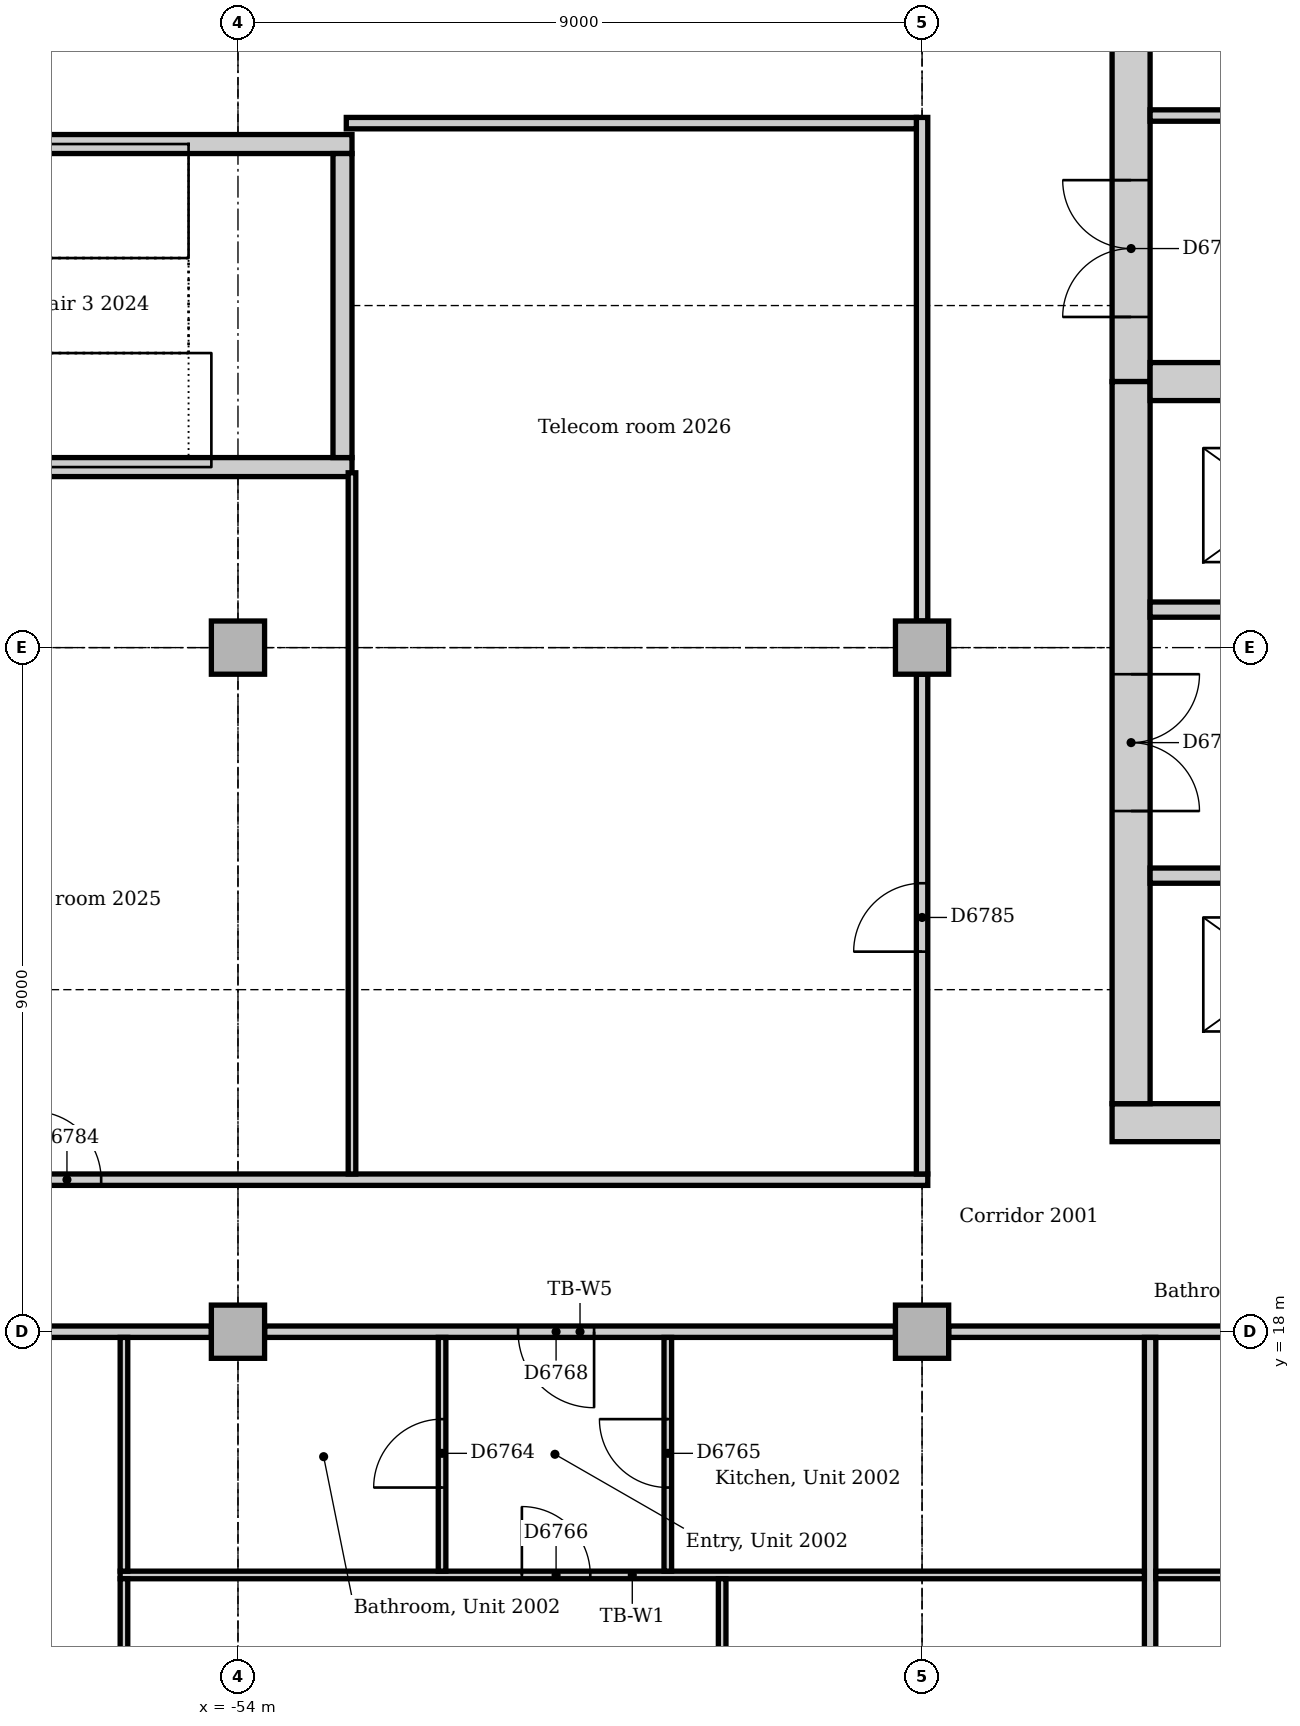
"""IFC4 building model, lengths in metres.
Left out: names, types, materials, properties, quantities, classifications, styles, units other than length and angle.
Written with IfcOpenShell. Run it as: python <this file> out.ifc"""

import sys

from ifc_helpers import new_model, si_unit, direction, frame, frame_2d, origin, origin_2d, place, context, subcontext, project, spatial, rectangle, extrude, element, fill, save


model = new_model("IFC4")
c1 = context("Model", 3, precision=1e-05, world=origin(), true_north=direction((0.0, 1.0)))
c2 = subcontext(c1, "Body", "Model", "MODEL_VIEW")
j1 = project(units=[si_unit("LENGTHUNIT", "METRE"), si_unit("PLANEANGLEUNIT", "RADIAN")], contexts=[c1])
p1 = place(None, origin())
s1 = spatial("IfcSite", under=j1, at=p1, CompositionType="ELEMENT")
p2 = place(p1, origin())
s2 = spatial("IfcBuilding", under=s1, at=p2, CompositionType="ELEMENT")
p3 = place(p2, frame((0.0, 0.0, 87.0)))
s3 = spatial("IfcBuildingStorey", under=s2, at=p3, CompositionType="ELEMENT", Elevation=87.0)
p4 = place(p3, frame((-42.5, 20.75, 0.0), z_axis=(0.0, 0.0, 1.0), x_axis=(1.0, 0.0, 0.0)))
e1 = element("IfcWall", 1, at=p4, inside=s3, PredefinedType="SOLIDWALL", context=c2, shape_type="SweptSolid", body=[
    extrude(rectangle(XDim=11.5, YDim=0.5, at=frame_2d((5.75, 0.0))), origin(), (0.0, 0.0, 1.0), 4.0),
])
p5 = place(p3, frame((-42.25, 42.0, 0.0), z_axis=(0.0, 0.0, 1.0), x_axis=(0.0, -1.0, 0.0)))
e2 = element("IfcWall", 2, at=p5, inside=s3, PredefinedType="SOLIDWALL", context=c2, shape_type="SweptSolid", body=[
    extrude(rectangle(XDim=11.5, YDim=0.5, at=frame_2d((5.75, 0.0))), origin(), (0.0, 0.0, 1.0), 4.0),
])
p6 = place(p5, frame((8.85, 0.0, 0.0)))
e3 = element("IfcOpeningElement", 3, at=p6, cuts=e2, PredefinedType="OPENING", context=c2, shape_type="SweptSolid", body=[
    extrude(rectangle(XDim=1.8, YDim=2.1, at=frame_2d((0.9, 1.05))), frame((0.0, 0.26, 0.0), z_axis=(0.0, -1.0, 0.0), x_axis=(1.0, 0.0, 0.0)), (0.0, 0.0, 1.0), 0.52),
])
p7 = place(p3, frame((-42.25, 30.5, 0.0), z_axis=(0.0, 0.0, 1.0), x_axis=(0.0, -1.0, 0.0)))
e4 = element("IfcWall", 4, at=p7, inside=s3, PredefinedType="SOLIDWALL", context=c2, shape_type="SweptSolid", body=[
    extrude(rectangle(XDim=9.5, YDim=0.5, at=frame_2d((4.75, 0.0))), origin(), (0.0, 0.0, 1.0), 4.0),
])
p8 = place(p7, frame((3.85, 0.0, 0.0)))
e5 = element("IfcOpeningElement", 5, at=p8, cuts=e4, PredefinedType="OPENING", context=c2, shape_type="SweptSolid", body=[
    extrude(rectangle(XDim=1.8, YDim=2.1, at=frame_2d((0.9, 1.05))), frame((0.0, 0.26, 0.0), z_axis=(0.0, -1.0, 0.0), x_axis=(1.0, 0.0, 0.0)), (0.0, 0.0, 1.0), 0.52),
])
p9 = place(p3, frame((-42.0, 30.5, 0.0), z_axis=(0.0, 0.0, 1.0), x_axis=(1.0, 0.0, 0.0)))
e6 = element("IfcWall", 6, at=p9, inside=s3, PredefinedType="SOLIDWALL", context=c2, shape_type="SweptSolid", body=[
    extrude(rectangle(XDim=10.5, YDim=0.5, at=frame_2d((5.25, 0.0))), origin(), (0.0, 0.0, 1.0), 4.0),
])
p10 = place(p3, frame((-60.0, 29.375, 0.0), z_axis=(0.0, 0.0, 1.0), x_axis=(1.0, 0.0, 0.0)))
e7 = element("IfcWall", 7, at=p10, inside=s3, PredefinedType="SOLIDWALL", context=c2, shape_type="SweptSolid", body=[
    extrude(rectangle(XDim=7.5, YDim=0.25, at=frame_2d((3.75, 0.0))), origin(), (0.0, 0.0, 1.0), 4.0),
])
p11 = place(p3, frame((-52.5, 33.625, 0.0), z_axis=(0.0, 0.0, 1.0), x_axis=(-1.0, 0.0, 0.0)))
e8 = element("IfcWall", 8, at=p11, inside=s3, PredefinedType="SOLIDWALL", context=c2, shape_type="SweptSolid", body=[
    extrude(rectangle(XDim=7.5, YDim=0.25, at=frame_2d((3.75, 0.0))), origin(), (0.0, 0.0, 1.0), 4.0),
])
p12 = place(p11, frame((6.0, 0.0, 0.0)))
e9 = element("IfcOpeningElement", 9, at=p12, cuts=e8, PredefinedType="OPENING", context=c2, shape_type="SweptSolid", body=[
    extrude(rectangle(XDim=1.0, YDim=2.1, at=frame_2d((0.5, 1.05))), frame((0.0, 0.135, 0.0), z_axis=(0.0, -1.0, 0.0), x_axis=(1.0, 0.0, 0.0)), (0.0, 0.0, 1.0), 0.27),
])
p13 = place(p3, frame((-52.625, 29.5, 0.0), z_axis=(0.0, 0.0, 1.0), x_axis=(0.0, 1.0, 0.0)))
e10 = element("IfcWall", 10, at=p13, inside=s3, PredefinedType="SOLIDWALL", context=c2, shape_type="SweptSolid", body=[
    extrude(rectangle(XDim=4.0, YDim=0.25, at=frame_2d((2.0, 0.0))), origin(), (0.0, 0.0, 1.0), 4.0),
])
for number, where, z_axis, x_axis in (
    (11, (-54.0, 18.0, 0.0), (0.0, 0.0, 1.0), (1.0, 0.0, 0.0)),
    (12, (-54.0, 27.0, 0.0), (0.0, 0.0, 1.0), (1.0, 0.0, 0.0)),
    (13, (-45.0, 18.0, 0.0), (0.0, 0.0, 1.0), (1.0, 0.0, 0.0)),
    (14, (-45.0, 27.0, 0.0), (0.0, 0.0, 1.0), (1.0, 0.0, 0.0)),
):
    element("IfcColumn", number, at=place(p3, frame(where, z_axis=z_axis, x_axis=x_axis)), inside=s3, PredefinedType="COLUMN", context=c2, shape_type="SweptSolid", body=[
        extrude(rectangle(XDim=0.7, YDim=0.7, at=origin_2d()), origin(), (0.0, 0.0, 1.0), 3.85),
    ])
p14 = place(p3, frame((-38.6, 24.0, 0.0), z_axis=(0.0, 0.0, 1.0), x_axis=(-1.0, 0.0, 0.0)))
e15 = element("IfcWall", 15, at=p14, inside=s3, PredefinedType="SOLIDWALL", context=c2, shape_type="SweptSolid", body=[
    extrude(rectangle(XDim=3.4, YDim=0.2, at=frame_2d((1.7, 0.0))), origin(), (0.0, 0.0, 1.0), 4.0),
])
p15 = place(p14, frame((0.85, 0.0, 0.0)))
e16 = element("IfcOpeningElement", 16, at=p15, cuts=e15, PredefinedType="OPENING", context=c2, shape_type="SweptSolid", body=[
    extrude(rectangle(XDim=1.1, YDim=2.1, at=frame_2d((0.55, 1.05))), frame((0.0, 0.11, 0.0), z_axis=(0.0, -1.0, 0.0), x_axis=(1.0, 0.0, 0.0)), (0.0, 0.0, 1.0), 0.22),
])
p16 = place(p3, frame((-42.0, 27.5, 0.0), z_axis=(0.0, 0.0, 1.0), x_axis=(1.0, 0.0, 0.0)))
e17 = element("IfcWall", 17, at=p16, inside=s3, PredefinedType="SOLIDWALL", context=c2, shape_type="SweptSolid", body=[
    extrude(rectangle(XDim=3.4, YDim=0.2, at=frame_2d((1.7, 0.0))), origin(), (0.0, 0.0, 1.0), 4.0),
])
p17 = place(p16, frame((1.45, 0.0, 0.0)))
e18 = element("IfcOpeningElement", 18, at=p17, cuts=e17, PredefinedType="OPENING", context=c2, shape_type="SweptSolid", body=[
    extrude(rectangle(XDim=1.1, YDim=2.1, at=frame_2d((0.55, 1.05))), frame((0.0, 0.11, 0.0), z_axis=(0.0, -1.0, 0.0), x_axis=(1.0, 0.0, 0.0)), (0.0, 0.0, 1.0), 0.22),
])
p18 = place(p3, frame((-37.425, 34.0, 0.0), z_axis=(0.0, 0.0, 1.0), x_axis=(-1.0, 0.0, 0.0)))
e19 = element("IfcWall", 19, at=p18, inside=s3, PredefinedType="PARTITIONING", context=c2, shape_type="SweptSolid", body=[
    extrude(rectangle(XDim=4.575, YDim=0.15, at=frame_2d((2.288, 0.0))), origin(), (0.0, 0.0, 1.0), 3.85),
])
p19 = place(p18, frame((1.925, 0.0, 0.0)))
e20 = element("IfcOpeningElement", 20, at=p19, cuts=e19, PredefinedType="OPENING", context=c2, shape_type="SweptSolid", body=[
    extrude(rectangle(XDim=0.8, YDim=2.1, at=frame_2d((0.4, 1.05))), frame((0.0, 0.085, 0.0), z_axis=(0.0, -1.0, 0.0), x_axis=(1.0, 0.0, 0.0)), (0.0, 0.0, 1.0), 0.17),
])
p20 = place(p3, frame((-44.65, 18.0, 0.0), z_axis=(0.0, 0.0, 1.0), x_axis=(1.0, 0.0, 0.0)))
e21 = element("IfcWall", 21, at=p20, inside=s3, PredefinedType="PARTITIONING", context=c2, shape_type="SweptSolid", body=[
    extrude(rectangle(XDim=8.3, YDim=0.15, at=frame_2d((4.15, 0.0))), origin(), (0.0, 0.0, 1.0), 3.158),
])
p21 = place(p20, frame((5.94, 0.0, 0.0)))
e22 = element("IfcOpeningElement", 22, at=p21, cuts=e21, PredefinedType="OPENING", context=c2, shape_type="SweptSolid", body=[
    extrude(rectangle(XDim=1.0, YDim=2.1, at=frame_2d((0.5, 1.05))), frame((0.0, 0.085, 0.0), z_axis=(0.0, -1.0, 0.0), x_axis=(1.0, 0.0, 0.0)), (0.0, 0.0, 1.0), 0.17),
])
p22 = place(p3, frame((-53.65, 18.0, 0.0), z_axis=(0.0, 0.0, 1.0), x_axis=(1.0, 0.0, 0.0)))
e23 = element("IfcWall", 23, at=p22, inside=s3, PredefinedType="PARTITIONING", context=c2, shape_type="SweptSolid", body=[
    extrude(rectangle(XDim=8.3, YDim=0.15, at=frame_2d((4.15, 0.0))), origin(), (0.0, 0.0, 1.0), 3.158),
])
p23 = place(p22, frame((3.335, 0.0, 0.0)))
e24 = element("IfcOpeningElement", 24, at=p23, cuts=e23, PredefinedType="OPENING", context=c2, shape_type="SweptSolid", body=[
    extrude(rectangle(XDim=1.0, YDim=2.1, at=frame_2d((0.5, 1.05))), frame((0.0, 0.085, 0.0), z_axis=(0.0, -1.0, 0.0), x_axis=(1.0, 0.0, 0.0)), (0.0, 0.0, 1.0), 0.17),
])
p24 = place(p3, frame((-64.596, 18.0, 0.0), z_axis=(0.0, 0.0, 1.0), x_axis=(1.0, 0.0, 0.0)))
e25 = element("IfcWall", 25, at=p24, inside=s3, PredefinedType="PARTITIONING", context=c2, shape_type="SweptSolid", body=[
    extrude(rectangle(XDim=10.246, YDim=0.15, at=frame_2d((5.123, 0.0))), origin(), (0.0, 0.0, 1.0), 3.158),
])
p25 = place(p24, frame((4.15, 0.0, 0.0)))
e26 = element("IfcOpeningElement", 26, at=p25, cuts=e25, PredefinedType="OPENING", context=c2, shape_type="SweptSolid", body=[
    extrude(rectangle(XDim=0.9, YDim=2.1, at=frame_2d((0.45, 1.05))), frame((0.0, 0.085, 0.0), z_axis=(0.0, -1.0, 0.0), x_axis=(1.0, 0.0, 0.0)), (0.0, 0.0, 1.0), 0.17),
])
p26 = place(p3, frame((-64.89, 20.0, 0.0), z_axis=(0.0, 0.0, 1.0), x_axis=(1.0, 0.0, 0.0)))
e27 = element("IfcWall", 27, at=p26, inside=s3, PredefinedType="PARTITIONING", context=c2, shape_type="SweptSolid", body=[
    extrude(rectangle(XDim=19.965, YDim=0.15, at=frame_2d((9.982, 0.0))), origin(), (0.0, 0.0, 1.0), 3.85),
])
p27 = place(p26, frame((2.05, 0.0, 0.0)))
e28 = element("IfcOpeningElement", 28, at=p27, cuts=e27, PredefinedType="OPENING", context=c2, shape_type="SweptSolid", body=[
    extrude(rectangle(XDim=0.9, YDim=2.1, at=frame_2d((0.45, 1.05))), frame((0.0, 0.085, 0.0), z_axis=(0.0, -1.0, 0.0), x_axis=(1.0, 0.0, 0.0)), (0.0, 0.0, 1.0), 0.17),
])
p28 = place(p26, frame((8.19, 0.0, 0.0)))
e29 = element("IfcOpeningElement", 29, at=p28, cuts=e27, PredefinedType="OPENING", context=c2, shape_type="SweptSolid", body=[
    extrude(rectangle(XDim=0.9, YDim=2.1, at=frame_2d((0.45, 1.05))), frame((0.0, 0.085, 0.0), z_axis=(0.0, -1.0, 0.0), x_axis=(1.0, 0.0, 0.0)), (0.0, 0.0, 1.0), 0.17),
])
p29 = place(p3, frame((-45.0, 20.075, 0.0), z_axis=(0.0, 0.0, 1.0), x_axis=(0.0, 1.0, 0.0)))
e30 = element("IfcWall", 30, at=p29, inside=s3, PredefinedType="PARTITIONING", context=c2, shape_type="SweptSolid", body=[
    extrude(rectangle(XDim=6.575, YDim=0.15, at=frame_2d((3.288, 0.0))), origin(), (0.0, 0.0, 1.0), 3.256),
])
p30 = place(p29, frame((2.925, 0.0, 0.0)))
e31 = element("IfcOpeningElement", 31, at=p30, cuts=e30, PredefinedType="OPENING", context=c2, shape_type="SweptSolid", body=[
    extrude(rectangle(XDim=0.9, YDim=2.1, at=frame_2d((0.45, 1.05))), frame((0.0, 0.085, 0.0), z_axis=(0.0, -1.0, 0.0), x_axis=(1.0, 0.0, 0.0)), (0.0, 0.0, 1.0), 0.17),
])
p31 = place(p3, frame((-45.0, 27.35, 0.0), z_axis=(0.0, 0.0, 1.0), x_axis=(0.0, 1.0, 0.0)))
e32 = element("IfcWall", 32, at=p31, inside=s3, PredefinedType="PARTITIONING", context=c2, shape_type="SweptSolid", body=[
    extrude(rectangle(XDim=6.625, YDim=0.15, at=frame_2d((3.312, 0.0))), origin(), (0.0, 0.0, 1.0), 3.256),
])
p32 = place(p3, frame((-52.575, 33.9, 0.0), z_axis=(0.0, 0.0, 1.0), x_axis=(1.0, 0.0, 0.0)))
e33 = element("IfcWall", 33, at=p32, inside=s3, PredefinedType="PARTITIONING", context=c2, shape_type="SweptSolid", body=[
    extrude(rectangle(XDim=7.5, YDim=0.15, at=frame_2d((3.75, 0.0))), origin(), (0.0, 0.0, 1.0), 3.85),
])
p33 = place(p3, frame((-42.0, 9.36, 0.0), z_axis=(0.0, 0.0, 1.0), x_axis=(0.0, 1.0, 0.0)))
e34 = element("IfcWall", 34, at=p33, inside=s3, PredefinedType="PARTITIONING", context=c2, shape_type="SweptSolid", body=[
    extrude(rectangle(XDim=8.565, YDim=0.15, at=frame_2d((4.282, 0.0))), origin(), (0.0, 0.0, 1.0), 3.85),
])
p34 = place(p3, frame((-55.55, 14.8, 0.0), z_axis=(0.0, 0.0, 1.0), x_axis=(1.0, 0.0, 0.0)))
e35 = element("IfcWall", 35, at=p34, inside=s3, PredefinedType="PARTITIONING", context=c2, shape_type="SweptSolid", body=[
    extrude(rectangle(XDim=13.475, YDim=0.1, at=frame_2d((6.737, 0.0))), origin(), (0.0, 0.0, 1.0), 3.85),
])
p35 = place(p34, frame((5.285, 0.0, 0.0)))
e36 = element("IfcOpeningElement", 36, at=p35, cuts=e35, PredefinedType="OPENING", context=c2, shape_type="SweptSolid", body=[
    extrude(rectangle(XDim=0.9, YDim=2.1, at=frame_2d((0.45, 1.05))), frame((0.0, 0.06, 0.0), z_axis=(0.0, -1.0, 0.0), x_axis=(1.0, 0.0, 0.0)), (0.0, 0.0, 1.0), 0.12),
])
p36 = place(p3, frame((-41.925, 14.8, 0.0), z_axis=(0.0, 0.0, 1.0), x_axis=(1.0, 0.0, 0.0)))
e37 = element("IfcWall", 37, at=p36, inside=s3, PredefinedType="PARTITIONING", context=c2, shape_type="SweptSolid", body=[
    extrude(rectangle(XDim=8.975, YDim=0.1, at=frame_2d((4.487, 0.0))), origin(), (0.0, 0.0, 1.0), 3.85),
])
p37 = place(p36, frame((3.265, 0.0, 0.0)))
e38 = element("IfcOpeningElement", 38, at=p37, cuts=e37, PredefinedType="OPENING", context=c2, shape_type="SweptSolid", body=[
    extrude(rectangle(XDim=0.9, YDim=2.1, at=frame_2d((0.45, 1.05))), frame((0.0, 0.06, 0.0), z_axis=(0.0, -1.0, 0.0), x_axis=(1.0, 0.0, 0.0)), (0.0, 0.0, 1.0), 0.12),
])
p38 = place(p3, frame((-52.5, 20.075, 0.0), z_axis=(0.0, 0.0, 1.0), x_axis=(0.0, 1.0, 0.0)))
e39 = element("IfcWall", 39, at=p38, inside=s3, PredefinedType="PARTITIONING", context=c2, shape_type="SweptSolid", body=[
    extrude(rectangle(XDim=9.225, YDim=0.1, at=frame_2d((4.612, 0.0))), origin(), (0.0, 0.0, 1.0), 3.85),
])
p39 = place(p3, frame((-55.5, 14.85, 0.0), z_axis=(0.0, 0.0, 1.0), x_axis=(0.0, 1.0, 0.0)))
e40 = element("IfcWall", 40, at=p39, inside=s3, PredefinedType="PARTITIONING", context=c2, shape_type="SweptSolid", body=[
    extrude(rectangle(XDim=3.075, YDim=0.1, at=frame_2d((1.538, 0.0))), origin(), (0.0, 0.0, 1.0), 3.85),
])
p40 = place(p3, frame((-55.5, 10.953, 0.0), z_axis=(0.0, 0.0, 1.0), x_axis=(0.0, 1.0, 0.0)))
e41 = element("IfcWall", 41, at=p40, inside=s3, PredefinedType="PARTITIONING", context=c2, shape_type="SweptSolid", body=[
    extrude(rectangle(XDim=3.797, YDim=0.1, at=frame_2d((1.898, 0.0))), origin(), (0.0, 0.0, 1.0), 3.85),
])
p41 = place(p3, frame((-47.63, 9.36, 0.0), z_axis=(0.0, 0.0, 1.0), x_axis=(0.0, 1.0, 0.0)))
e42 = element("IfcWall", 42, at=p41, inside=s3, PredefinedType="PARTITIONING", context=c2, shape_type="SweptSolid", body=[
    extrude(rectangle(XDim=5.39, YDim=0.1, at=frame_2d((2.695, 0.0))), origin(), (0.0, 0.0, 1.0), 3.85),
])
p42 = place(p41, frame((2.25, 0.0, 0.0)))
e43 = element("IfcOpeningElement", 43, at=p42, cuts=e42, PredefinedType="OPENING", context=c2, shape_type="SweptSolid", body=[
    extrude(rectangle(XDim=0.9, YDim=2.1, at=frame_2d((0.45, 1.05))), frame((0.0, 0.06, 0.0), z_axis=(0.0, -1.0, 0.0), x_axis=(1.0, 0.0, 0.0)), (0.0, 0.0, 1.0), 0.12),
])
p43 = place(p3, frame((-51.315, 14.85, 0.0), z_axis=(0.0, 0.0, 1.0), x_axis=(0.0, 1.0, 0.0)))
e44 = element("IfcWall", 44, at=p43, inside=s3, PredefinedType="PARTITIONING", context=c2, shape_type="SweptSolid", body=[
    extrude(rectangle(XDim=3.075, YDim=0.1, at=frame_2d((1.538, 0.0))), origin(), (0.0, 0.0, 1.0), 3.85),
])
p44 = place(p43, frame((1.1, 0.0, 0.0)))
e45 = element("IfcOpeningElement", 45, at=p44, cuts=e44, PredefinedType="OPENING", context=c2, shape_type="SweptSolid", body=[
    extrude(rectangle(XDim=0.9, YDim=2.1, at=frame_2d((0.45, 1.05))), frame((0.0, 0.06, 0.0), z_axis=(0.0, -1.0, 0.0), x_axis=(1.0, 0.0, 0.0)), (0.0, 0.0, 1.0), 0.12),
])
p45 = place(p3, frame((-48.345, 14.85, 0.0), z_axis=(0.0, 0.0, 1.0), x_axis=(0.0, 1.0, 0.0)))
e46 = element("IfcWall", 46, at=p45, inside=s3, PredefinedType="PARTITIONING", context=c2, shape_type="SweptSolid", body=[
    extrude(rectangle(XDim=3.075, YDim=0.1, at=frame_2d((1.538, 0.0))), origin(), (0.0, 0.0, 1.0), 3.85),
])
p46 = place(p45, frame((1.1, 0.0, 0.0)))
e47 = element("IfcOpeningElement", 47, at=p46, cuts=e46, PredefinedType="OPENING", context=c2, shape_type="SweptSolid", body=[
    extrude(rectangle(XDim=0.9, YDim=2.1, at=frame_2d((0.45, 1.05))), frame((0.0, 0.06, 0.0), z_axis=(0.0, -1.0, 0.0), x_axis=(1.0, 0.0, 0.0)), (0.0, 0.0, 1.0), 0.12),
])
p47 = place(p8, origin())
e48 = element("IfcDoor", 48, at=p47, inside=s3, OperationType="DOUBLE_DOOR_SINGLE_SWING", PredefinedType="DOOR", context=c2, shape_type="SweptSolid", body=[
    extrude(rectangle(XDim=1.8, YDim=2.1, at=frame_2d((0.9, 1.05))), frame((0.0, 0.025, 0.0), z_axis=(0.0, -1.0, 0.0), x_axis=(1.0, 0.0, 0.0)), (0.0, 0.0, 1.0), 0.05),
])
fill(e5, e48)
p48 = place(p6, frame((1.8, 0.0, 0.0), z_axis=(0.0, 0.0, 1.0), x_axis=(-1.0, 0.0, 0.0)))
e49 = element("IfcDoor", 49, at=p48, inside=s3, OperationType="DOUBLE_DOOR_SINGLE_SWING", PredefinedType="DOOR", context=c2, shape_type="SweptSolid", body=[
    extrude(rectangle(XDim=1.8, YDim=2.1, at=frame_2d((0.9, 1.05))), frame((0.0, 0.025, 0.0), z_axis=(0.0, -1.0, 0.0), x_axis=(1.0, 0.0, 0.0)), (0.0, 0.0, 1.0), 0.05),
])
fill(e3, e49)
p49 = place(p44, origin())
e50 = element("IfcDoor", 50, at=p49, inside=s3, OperationType="SINGLE_SWING_LEFT", PredefinedType="DOOR", context=c2, shape_type="SweptSolid", body=[
    extrude(rectangle(XDim=0.9, YDim=2.1, at=frame_2d((0.45, 1.05))), frame((0.0, 0.025, 0.0), z_axis=(0.0, -1.0, 0.0), x_axis=(1.0, 0.0, 0.0)), (0.0, 0.0, 1.0), 0.05),
])
fill(e45, e50)
p50 = place(p46, origin())
e51 = element("IfcDoor", 51, at=p50, inside=s3, OperationType="SINGLE_SWING_RIGHT", PredefinedType="DOOR", context=c2, shape_type="SweptSolid", body=[
    extrude(rectangle(XDim=0.9, YDim=2.1, at=frame_2d((0.45, 1.05))), frame((0.0, 0.025, 0.0), z_axis=(0.0, -1.0, 0.0), x_axis=(1.0, 0.0, 0.0)), (0.0, 0.0, 1.0), 0.05),
])
fill(e47, e51)
p51 = place(p35, origin())
e52 = element("IfcDoor", 52, at=p51, inside=s3, OperationType="SINGLE_SWING_LEFT", PredefinedType="DOOR", context=c2, shape_type="SweptSolid", body=[
    extrude(rectangle(XDim=0.9, YDim=2.1, at=frame_2d((0.45, 1.05))), frame((0.0, 0.025, 0.0), z_axis=(0.0, -1.0, 0.0), x_axis=(1.0, 0.0, 0.0)), (0.0, 0.0, 1.0), 0.05),
])
fill(e36, e52)
p52 = place(p23, frame((1.0, 0.0, 0.0), z_axis=(0.0, 0.0, 1.0), x_axis=(-1.0, 0.0, 0.0)))
e53 = element("IfcDoor", 53, at=p52, inside=s3, OperationType="SINGLE_SWING_LEFT", PredefinedType="DOOR", context=c2, shape_type="SweptSolid", body=[
    extrude(rectangle(XDim=1.0, YDim=2.1, at=frame_2d((0.5, 1.05))), frame((0.0, 0.025, 0.0), z_axis=(0.0, -1.0, 0.0), x_axis=(1.0, 0.0, 0.0)), (0.0, 0.0, 1.0), 0.05),
])
fill(e24, e53)
p53 = place(p28, origin())
e54 = element("IfcDoor", 54, at=p53, inside=s3, OperationType="SINGLE_SWING_LEFT", PredefinedType="DOOR", context=c2, shape_type="SweptSolid", body=[
    extrude(rectangle(XDim=0.9, YDim=2.1, at=frame_2d((0.45, 1.05))), frame((0.0, 0.025, 0.0), z_axis=(0.0, -1.0, 0.0), x_axis=(1.0, 0.0, 0.0)), (0.0, 0.0, 1.0), 0.05),
])
fill(e29, e54)
p54 = place(p30, origin())
e55 = element("IfcDoor", 55, at=p54, inside=s3, OperationType="SINGLE_SWING_LEFT", PredefinedType="DOOR", context=c2, shape_type="SweptSolid", body=[
    extrude(rectangle(XDim=0.9, YDim=2.1, at=frame_2d((0.45, 1.05))), frame((0.0, 0.025, 0.0), z_axis=(0.0, -1.0, 0.0), x_axis=(1.0, 0.0, 0.0)), (0.0, 0.0, 1.0), 0.05),
])
fill(e31, e55)
save(model, sys.argv[1])
